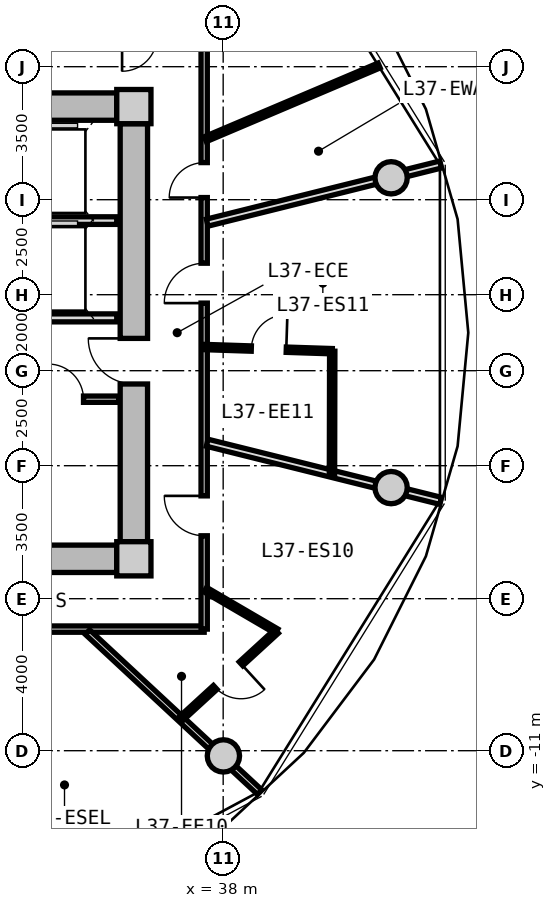
"""IFC4 building model, lengths in metres.
Left out: names, types, materials, properties, quantities, classifications, styles, units other than length and angle.
Written with IfcOpenShell. Run it as: python <this file> out.ifc"""

import sys

from ifc_helpers import new_model, si_unit, direction, frame, frame_2d, origin, origin_2d, place, context, subcontext, project, spatial, rectangle, circle, extrude, source, transform, mapped, element, fill, save


model = new_model("IFC4")
c1 = context("Model", 3, precision=1e-05, world=origin(), true_north=direction((0.0, 1.0)))
c2 = subcontext(c1, "Body", "Model", "MODEL_VIEW")
j1 = project(units=[si_unit("LENGTHUNIT", "METRE"), si_unit("PLANEANGLEUNIT", "RADIAN")], contexts=[c1])
p1 = place(None, origin())
s1 = spatial("IfcSite", under=j1, at=p1, CompositionType="ELEMENT")
p2 = place(p1, origin())
s2 = spatial("IfcBuilding", under=s1, at=p2, CompositionType="ELEMENT")
p3 = place(p2, frame((0.0, 0.0, 120.65)))
s3 = spatial("IfcBuildingStorey", under=s2, at=p3, CompositionType="ELEMENT", Elevation=120.65)
m1 = source(origin(), c2, "Body", "SweptSolid", [
    extrude(rectangle(XDim=0.9, YDim=0.9, at=origin_2d()), origin(), (0.0, 0.0, 1.0), 3.05),
])
for number, where, z_axis, x_axis in (
    (1, (35.65, -5.95, 0.0), (0.0, 0.0, 1.0), (1.0, 0.0, 0.0)),
    (2, (35.65, 5.95, 0.0), (0.0, 0.0, 1.0), (1.0, 0.0, 0.0)),
):
    element("IfcColumn", number, at=place(p3, frame(where, z_axis=z_axis, x_axis=x_axis)), inside=s3, PredefinedType="COLUMN", context=c2, shape_type="MappedRepresentation", body=[
        mapped(m1, transform((0.0, 0.0, 0.0), x_axis=(1.0, 0.0, 0.0), y_axis=(0.0, 1.0, 0.0), z_axis=(0.0, 0.0, 1.0), scale=1.0)),
    ])
m2 = source(origin(), c2, "Body", "SweptSolid", [
    extrude(rectangle(XDim=14.4, YDim=0.72, at=frame_2d((7.2, 0.0))), origin(), (0.0, 0.0, 1.0), 2.79),
])
for number, where, z_axis, x_axis in (
    (3, (20.8, 5.95, 0.0), (0.0, 0.0, 1.0), (1.0, 0.0, 0.0)),
    (4, (35.2, -5.95, 0.0), (0.0, 0.0, 1.0), (-1.0, 0.0, 0.0)),
):
    element("IfcWall", number, at=place(p3, frame(where, z_axis=z_axis, x_axis=x_axis)), inside=s3, PredefinedType="SHEAR", context=c2, shape_type="MappedRepresentation", body=[
        mapped(m2, transform((0.0, 0.0, 0.0), x_axis=(1.0, 0.0, 0.0), y_axis=(0.0, 1.0, 0.0), z_axis=(0.0, 0.0, 1.0), scale=1.0)),
    ])
m3 = source(origin(), c2, "Body", "SweptSolid", [
    extrude(rectangle(XDim=11.0, YDim=0.72, at=frame_2d((5.5, 0.0))), origin(), (0.0, 0.0, 1.0), 2.79),
])
p4 = place(p3, frame((35.65, 5.5, 0.0), z_axis=(0.0, 0.0, 1.0), x_axis=(0.0, -1.0, 0.0)))
e5 = element("IfcWall", 5, at=p4, inside=s3, PredefinedType="SHEAR", context=c2, shape_type="MappedRepresentation", body=[
    mapped(m3, transform((0.0, 0.0, 0.0), x_axis=(1.0, 0.0, 0.0), y_axis=(0.0, 1.0, 0.0), z_axis=(0.0, 0.0, 1.0), scale=1.0)),
])
p5 = place(p4, frame((5.65, 0.0, 0.0)))
e6 = element("IfcOpeningElement", 6, at=p5, cuts=e5, PredefinedType="OPENING", context=c2, shape_type="SweptSolid", body=[
    extrude(rectangle(XDim=1.2, YDim=2.15, at=frame_2d((0.6, 1.075))), frame((0.0, 0.37, 0.0), z_axis=(0.0, -1.0, 0.0), x_axis=(1.0, 0.0, 0.0)), (0.0, 0.0, 1.0), 0.74),
])
m4 = source(origin(), c2, "Body", "SweptSolid", [
    extrude(circle(Radius=0.425, at=origin_2d()), origin(), (0.0, 0.0, 1.0), 3.05),
])
for number, where, z_axis, x_axis in (
    (7, (42.419, 4.076, 0.0), (0.0, 0.0, 1.0), (1.0, 0.0, 0.0)),
    (8, (38.006, -11.137, 0.0), (0.0, 0.0, 1.0), (1.0, 0.0, 0.0)),
    (9, (42.419, -4.076, 0.0), (0.0, 0.0, 1.0), (1.0, 0.0, 0.0)),
):
    element("IfcColumn", number, at=place(p3, frame(where, z_axis=z_axis, x_axis=x_axis)), inside=s3, PredefinedType="COLUMN", context=c2, shape_type="MappedRepresentation", body=[
        mapped(m4, transform((0.0, 0.0, 0.0), x_axis=(1.0, 0.0, 0.0), y_axis=(0.0, 1.0, 0.0), z_axis=(0.0, 0.0, 1.0), scale=1.0)),
    ])
m5 = source(origin(), c2, "Body", "SweptSolid", [
    extrude(rectangle(XDim=3.2, YDim=0.2, at=frame_2d((1.6, 0.0))), origin(), (0.0, 0.0, 1.0), 2.775),
])
p6 = place(p3, frame((32.0, 2.95, 0.0), z_axis=(0.0, 0.0, 1.0), x_axis=(1.0, 0.0, 0.0)))
e10 = element("IfcWall", 10, at=p6, inside=s3, PredefinedType="PARTITIONING", context=c2, shape_type="MappedRepresentation", body=[
    mapped(m5, transform((0.0, 0.0, 0.0), x_axis=(1.0, 0.0, 0.0), y_axis=(0.0, 1.0, 0.0), z_axis=(0.0, 0.0, 1.0), scale=1.0)),
])
m6 = source(origin(), c2, "Body", "SweptSolid", [
    extrude(rectangle(XDim=6.66, YDim=0.21, at=frame_2d((3.33, 0.0))), origin(), (0.0, 0.0, 1.0), 2.775),
])
p7 = place(p3, frame((28.54, 0.39, 0.0), z_axis=(0.0, 0.0, 1.0), x_axis=(1.0, 0.0, 0.0)))
e11 = element("IfcWall", 11, at=p7, inside=s3, PredefinedType="PARTITIONING", context=c2, shape_type="MappedRepresentation", body=[
    mapped(m6, transform((0.0, 0.0, 0.0), x_axis=(1.0, 0.0, 0.0), y_axis=(0.0, 1.0, 0.0), z_axis=(0.0, 0.0, 1.0), scale=1.0)),
])
p8 = place(p7, frame((1.0, 0.0, 0.0)))
e12 = element("IfcOpeningElement", 12, at=p8, cuts=e11, PredefinedType="OPENING", context=c2, shape_type="SweptSolid", body=[
    extrude(rectangle(XDim=1.2, YDim=2.15, at=frame_2d((0.6, 1.075))), frame((0.0, 0.115, 0.0), z_axis=(0.0, -1.0, 0.0), x_axis=(1.0, 0.0, 0.0)), (0.0, 0.0, 1.0), 0.23),
])
m7 = source(origin(), c2, "Body", "SweptSolid", [
    extrude(rectangle(XDim=2.7, YDim=0.165, at=frame_2d((1.35, 0.0))), origin(), (0.0, 0.0, 1.0), 2.775),
])
p9 = place(p3, frame((32.55, -1.75, 0.0), z_axis=(0.0, 0.0, 1.0), x_axis=(1.0, 0.0, 0.0)))
e13 = element("IfcWall", 13, at=p9, inside=s3, PredefinedType="PARTITIONING", context=c2, shape_type="MappedRepresentation", body=[
    mapped(m7, transform((0.0, 0.0, 0.0), x_axis=(1.0, 0.0, 0.0), y_axis=(0.0, 1.0, 0.0), z_axis=(0.0, 0.0, 1.0), scale=1.0)),
])
p10 = place(p9, frame((0.85, 0.0, 0.0)))
e14 = element("IfcOpeningElement", 14, at=p10, cuts=e13, PredefinedType="OPENING", context=c2, shape_type="SweptSolid", body=[
    extrude(rectangle(XDim=0.925, YDim=2.1, at=frame_2d((0.462, 1.05))), frame((0.0, 0.093, 0.0), z_axis=(0.0, -1.0, 0.0), x_axis=(1.0, 0.0, 0.0)), (0.0, 0.0, 1.0), 0.185),
])
m8 = source(origin(), c2, "Body", "SweptSolid", [
    extrude(rectangle(XDim=8.6, YDim=0.165, at=frame_2d((4.3, 0.0))), origin(), (0.0, 0.0, 1.0), 2.775),
])
p11 = place(p3, frame((37.5, -7.8, 0.0), z_axis=(0.0, 0.0, 1.0), x_axis=(-1.0, 0.0, 0.0)))
e15 = element("IfcWall", 15, at=p11, inside=s3, PredefinedType="PARTITIONING", context=c2, shape_type="MappedRepresentation", body=[
    mapped(m8, transform((0.0, 0.0, 0.0), x_axis=(1.0, 0.0, 0.0), y_axis=(0.0, 1.0, 0.0), z_axis=(0.0, 0.0, 1.0), scale=1.0)),
])
m9 = source(origin(), c2, "Body", "SweptSolid", [
    extrude(rectangle(XDim=15.6, YDim=0.165, at=frame_2d((7.8, 0.0))), origin(), (0.0, 0.0, 1.0), 2.775),
])
p12 = place(p3, frame((37.5, 7.8, 0.0), z_axis=(0.0, 0.0, 1.0), x_axis=(0.0, -1.0, 0.0)))
e16 = element("IfcWall", 16, at=p12, inside=s3, PredefinedType="PARTITIONING", context=c2, shape_type="MappedRepresentation", body=[
    mapped(m9, transform((0.0, 0.0, 0.0), x_axis=(1.0, 0.0, 0.0), y_axis=(0.0, 1.0, 0.0), z_axis=(0.0, 0.0, 1.0), scale=1.0)),
])
p13 = place(p12, frame((12.094, 0.0, 0.0)))
e17 = element("IfcOpeningElement", 17, at=p13, cuts=e16, PredefinedType="OPENING", context=c2, shape_type="SweptSolid", body=[
    extrude(rectangle(XDim=1.05, YDim=2.15, at=frame_2d((0.525, 1.075))), frame((0.0, 0.093, 0.0), z_axis=(0.0, -1.0, 0.0), x_axis=(1.0, 0.0, 0.0)), (0.0, 0.0, 1.0), 0.185),
])
p14 = place(p12, frame((5.971, 0.0, 0.0)))
e18 = element("IfcOpeningElement", 18, at=p14, cuts=e16, PredefinedType="OPENING", context=c2, shape_type="SweptSolid", body=[
    extrude(rectangle(XDim=1.05, YDim=2.15, at=frame_2d((0.525, 1.075))), frame((0.0, 0.093, 0.0), z_axis=(0.0, -1.0, 0.0), x_axis=(1.0, 0.0, 0.0)), (0.0, 0.0, 1.0), 0.185),
])
p15 = place(p12, frame((3.324, 0.0, 0.0)))
e19 = element("IfcOpeningElement", 19, at=p15, cuts=e16, PredefinedType="OPENING", context=c2, shape_type="SweptSolid", body=[
    extrude(rectangle(XDim=0.92, YDim=2.1, at=frame_2d((0.46, 1.05))), frame((0.0, 0.093, 0.0), z_axis=(0.0, -1.0, 0.0), x_axis=(1.0, 0.0, 0.0)), (0.0, 0.0, 1.0), 0.185),
])
m10 = source(origin(), c2, "Body", "SweptSolid", [
    extrude(rectangle(XDim=6.187, YDim=0.165, at=frame_2d((3.093, 0.0))), origin(), (0.0, 0.0, 1.0), 2.275),
])
p16 = place(p3, frame((34.429, -7.88, 0.0), z_axis=(0.0, 0.0, 1.0), x_axis=(0.732501077882, -0.680765870841, 0.0)))
e20 = element("IfcWall", 20, at=p16, inside=s3, PredefinedType="PARTITIONING", context=c2, shape_type="MappedRepresentation", body=[
    mapped(m10, transform((0.0, 0.0, 0.0), x_axis=(1.0, 0.0, 0.0), y_axis=(0.0, 1.0, 0.0), z_axis=(0.0, 0.0, 1.0), scale=1.0)),
])
m11 = source(origin(), c2, "Body", "SweptSolid", [
    extrude(rectangle(XDim=6.331, YDim=0.19, at=frame_2d((3.165, 0.0))), origin(), (0.0, 0.0, 1.0), 2.275),
])
p17 = place(p3, frame((37.58, -2.896, 0.0), z_axis=(0.0, 0.0, 1.0), x_axis=(0.97036440661, -0.241646267062, 0.0)))
e21 = element("IfcWall", 21, at=p17, inside=s3, PredefinedType="PARTITIONING", context=c2, shape_type="MappedRepresentation", body=[
    mapped(m11, transform((0.0, 0.0, 0.0), x_axis=(1.0, 0.0, 0.0), y_axis=(0.0, 1.0, 0.0), z_axis=(0.0, 0.0, 1.0), scale=1.0)),
])
m12 = source(origin(), c2, "Body", "SweptSolid", [
    extrude(rectangle(XDim=2.172, YDim=0.14, at=frame_2d((1.086, 0.0))), origin(), (0.0, 0.0, 1.0), 2.775),
])
p18 = place(p3, frame((37.53, -6.762, 0.0), z_axis=(0.0, 0.0, 1.0), x_axis=(0.863562702562, -0.504241468688, 0.0)))
e22 = element("IfcWall", 22, at=p18, inside=s3, PredefinedType="PARTITIONING", context=c2, shape_type="MappedRepresentation", body=[
    mapped(m12, transform((0.0, 0.0, 0.0), x_axis=(1.0, 0.0, 0.0), y_axis=(0.0, 1.0, 0.0), z_axis=(0.0, 0.0, 1.0), scale=1.0)),
])
m13 = source(origin(), c2, "Body", "SweptSolid", [
    extrude(rectangle(XDim=3.457, YDim=0.14, at=frame_2d((1.729, 0.0))), origin(), (0.0, 0.0, 1.0), 2.775),
])
p19 = place(p3, frame((39.405, -7.857, 0.0), z_axis=(0.0, 0.0, 1.0), x_axis=(-0.737567375492, -0.675273549467, 0.0)))
e23 = element("IfcWall", 23, at=p19, inside=s3, PredefinedType="PARTITIONING", context=c2, shape_type="MappedRepresentation", body=[
    mapped(m13, transform((0.0, 0.0, 0.0), x_axis=(1.0, 0.0, 0.0), y_axis=(0.0, 1.0, 0.0), z_axis=(0.0, 0.0, 1.0), scale=1.0)),
])
p20 = place(p19, frame((1.268, 0.0, 0.0)))
e24 = element("IfcOpeningElement", 24, at=p20, cuts=e23, PredefinedType="OPENING", context=c2, shape_type="SweptSolid", body=[
    extrude(rectangle(XDim=0.92, YDim=2.1, at=frame_2d((0.46, 1.05))), frame((0.0, 0.08, 0.0), z_axis=(0.0, -1.0, 0.0), x_axis=(1.0, 0.0, 0.0)), (0.0, 0.0, 1.0), 0.16),
])
p21 = place(p3, frame((37.58, 2.896, 0.0), z_axis=(0.0, 0.0, 1.0), x_axis=(0.97036440661, 0.241646267062, 0.0)))
e25 = element("IfcWall", 25, at=p21, inside=s3, PredefinedType="PARTITIONING", context=c2, shape_type="MappedRepresentation", body=[
    mapped(m11, transform((0.0, 0.0, 0.0), x_axis=(1.0, 0.0, 0.0), y_axis=(0.0, 1.0, 0.0), z_axis=(0.0, 0.0, 1.0), scale=1.0)),
])
m14 = source(origin(), c2, "Body", "SweptSolid", [
    extrude(rectangle(XDim=3.342, YDim=0.14, at=frame_2d((1.671, 0.0))), origin(), (0.0, 0.0, 1.0), 2.775),
])
p22 = place(p3, frame((37.53, -0.378, 0.0), z_axis=(0.0, 0.0, 1.0), x_axis=(0.999468967034, -0.032585026264, 0.0)))
e26 = element("IfcWall", 26, at=p22, inside=s3, PredefinedType="PARTITIONING", context=c2, shape_type="MappedRepresentation", body=[
    mapped(m14, transform((0.0, 0.0, 0.0), x_axis=(1.0, 0.0, 0.0), y_axis=(0.0, 1.0, 0.0), z_axis=(0.0, 0.0, 1.0), scale=1.0)),
])
p23 = place(p22, frame((1.211, 0.0, 0.0)))
e27 = element("IfcOpeningElement", 27, at=p23, cuts=e26, PredefinedType="OPENING", context=c2, shape_type="SweptSolid", body=[
    extrude(rectangle(XDim=0.92, YDim=2.1, at=frame_2d((0.46, 1.05))), frame((0.0, 0.08, 0.0), z_axis=(0.0, -1.0, 0.0), x_axis=(1.0, 0.0, 0.0)), (0.0, 0.0, 1.0), 0.16),
])
m15 = source(origin(), c2, "Body", "SweptSolid", [
    extrude(rectangle(XDim=3.247, YDim=0.14, at=frame_2d((1.624, 0.0))), origin(), (0.0, 0.0, 1.0), 2.775),
])
p24 = place(p3, frame((40.87, -0.487, 0.0), z_axis=(0.0, 0.0, 1.0), x_axis=(-0.002105100215, -0.999997784274, 0.0)))
e28 = element("IfcWall", 28, at=p24, inside=s3, PredefinedType="PARTITIONING", context=c2, shape_type="MappedRepresentation", body=[
    mapped(m15, transform((0.0, 0.0, 0.0), x_axis=(1.0, 0.0, 0.0), y_axis=(0.0, 1.0, 0.0), z_axis=(0.0, 0.0, 1.0), scale=1.0)),
])
m16 = source(origin(), c2, "Body", "SweptSolid", [
    extrude(rectangle(XDim=4.968, YDim=0.14, at=frame_2d((2.484, 0.0))), origin(), (0.0, 0.0, 1.0), 2.775),
])
p25 = place(p3, frame((37.53, 5.092, 0.0), z_axis=(0.0, 0.0, 1.0), x_axis=(0.920595165864, 0.39051829738, 0.0)))
e29 = element("IfcWall", 29, at=p25, inside=s3, PredefinedType="PARTITIONING", context=c2, shape_type="MappedRepresentation", body=[
    mapped(m16, transform((0.0, 0.0, 0.0), x_axis=(1.0, 0.0, 0.0), y_axis=(0.0, 1.0, 0.0), z_axis=(0.0, 0.0, 1.0), scale=1.0)),
])
m17 = source(origin(), c2, "Body", "SweptSolid", [
    extrude(rectangle(XDim=1.2, YDim=2.15, at=frame_2d((0.6, 1.075))), frame((0.0, 0.025, 0.0), z_axis=(0.0, -1.0, 0.0), x_axis=(1.0, 0.0, 0.0)), (0.0, 0.0, 1.0), 0.05),
])
p26 = place(p5, frame((1.2, 0.0, 0.0), z_axis=(0.0, 0.0, 1.0), x_axis=(-1.0, 0.0, 0.0)))
e30 = element("IfcDoor", 30, at=p26, inside=s3, OperationType="SINGLE_SWING_RIGHT", PredefinedType="DOOR", context=c2, shape_type="MappedRepresentation", body=[
    mapped(m17, transform((0.0, 0.0, 0.0), x_axis=(1.0, 0.0, 0.0), y_axis=(0.0, 1.0, 0.0), z_axis=(0.0, 0.0, 1.0), scale=1.0)),
])
fill(e6, e30)
m18 = source(origin(), c2, "Body", "SweptSolid", [
    extrude(rectangle(XDim=0.925, YDim=2.1, at=frame_2d((0.462, 1.05))), frame((0.0, 0.025, 0.0), z_axis=(0.0, -1.0, 0.0), x_axis=(1.0, 0.0, 0.0)), (0.0, 0.0, 1.0), 0.05),
])
p27 = place(p10, origin())
e31 = element("IfcDoor", 31, at=p27, inside=s3, OperationType="SINGLE_SWING_LEFT", PredefinedType="DOOR", context=c2, shape_type="MappedRepresentation", body=[
    mapped(m18, transform((0.0, 0.0, 0.0), x_axis=(1.0, 0.0, 0.0), y_axis=(0.0, 1.0, 0.0), z_axis=(0.0, 0.0, 1.0), scale=1.0)),
])
fill(e14, e31)
m19 = source(origin(), c2, "Body", "SweptSolid", [
    extrude(rectangle(XDim=1.05, YDim=2.15, at=frame_2d((0.525, 1.075))), frame((0.0, 0.025, 0.0), z_axis=(0.0, -1.0, 0.0), x_axis=(1.0, 0.0, 0.0)), (0.0, 0.0, 1.0), 0.05),
])
p28 = place(p13, frame((1.05, 0.0, 0.0), z_axis=(0.0, 0.0, 1.0), x_axis=(-1.0, 0.0, 0.0)))
e32 = element("IfcDoor", 32, at=p28, inside=s3, OperationType="SINGLE_SWING_RIGHT", PredefinedType="DOOR", context=c2, shape_type="MappedRepresentation", body=[
    mapped(m19, transform((0.0, 0.0, 0.0), x_axis=(1.0, 0.0, 0.0), y_axis=(0.0, 1.0, 0.0), z_axis=(0.0, 0.0, 1.0), scale=1.0)),
])
fill(e17, e32)
m20 = source(origin(), c2, "Body", "SweptSolid", [
    extrude(rectangle(XDim=0.92, YDim=2.1, at=frame_2d((0.46, 1.05))), frame((0.0, 0.025, 0.0), z_axis=(0.0, -1.0, 0.0), x_axis=(1.0, 0.0, 0.0)), (0.0, 0.0, 1.0), 0.05),
])
p29 = place(p20, origin())
e33 = element("IfcDoor", 33, at=p29, inside=s3, OperationType="SINGLE_SWING_LEFT", PredefinedType="DOOR", context=c2, shape_type="MappedRepresentation", body=[
    mapped(m20, transform((0.0, 0.0, 0.0), x_axis=(1.0, 0.0, 0.0), y_axis=(0.0, 1.0, 0.0), z_axis=(0.0, 0.0, 1.0), scale=1.0)),
])
fill(e24, e33)
p30 = place(p14, frame((1.05, 0.0, 0.0), z_axis=(0.0, 0.0, 1.0), x_axis=(-1.0, 0.0, 0.0)))
e34 = element("IfcDoor", 34, at=p30, inside=s3, OperationType="SINGLE_SWING_LEFT", PredefinedType="DOOR", context=c2, shape_type="MappedRepresentation", body=[
    mapped(m19, transform((0.0, 0.0, 0.0), x_axis=(1.0, 0.0, 0.0), y_axis=(0.0, 1.0, 0.0), z_axis=(0.0, 0.0, 1.0), scale=1.0)),
])
fill(e18, e34)
p31 = place(p23, origin())
e35 = element("IfcDoor", 35, at=p31, inside=s3, OperationType="SINGLE_SWING_RIGHT", PredefinedType="DOOR", context=c2, shape_type="MappedRepresentation", body=[
    mapped(m20, transform((0.0, 0.0, 0.0), x_axis=(1.0, 0.0, 0.0), y_axis=(0.0, 1.0, 0.0), z_axis=(0.0, 0.0, 1.0), scale=1.0)),
])
fill(e27, e35)
p32 = place(p15, frame((0.92, 0.0, 0.0), z_axis=(0.0, 0.0, 1.0), x_axis=(-1.0, 0.0, 0.0)))
e36 = element("IfcDoor", 36, at=p32, inside=s3, OperationType="SINGLE_SWING_LEFT", PredefinedType="DOOR", context=c2, shape_type="MappedRepresentation", body=[
    mapped(m20, transform((0.0, 0.0, 0.0), x_axis=(1.0, 0.0, 0.0), y_axis=(0.0, 1.0, 0.0), z_axis=(0.0, 0.0, 1.0), scale=1.0)),
])
fill(e19, e36)
save(model, sys.argv[1])
